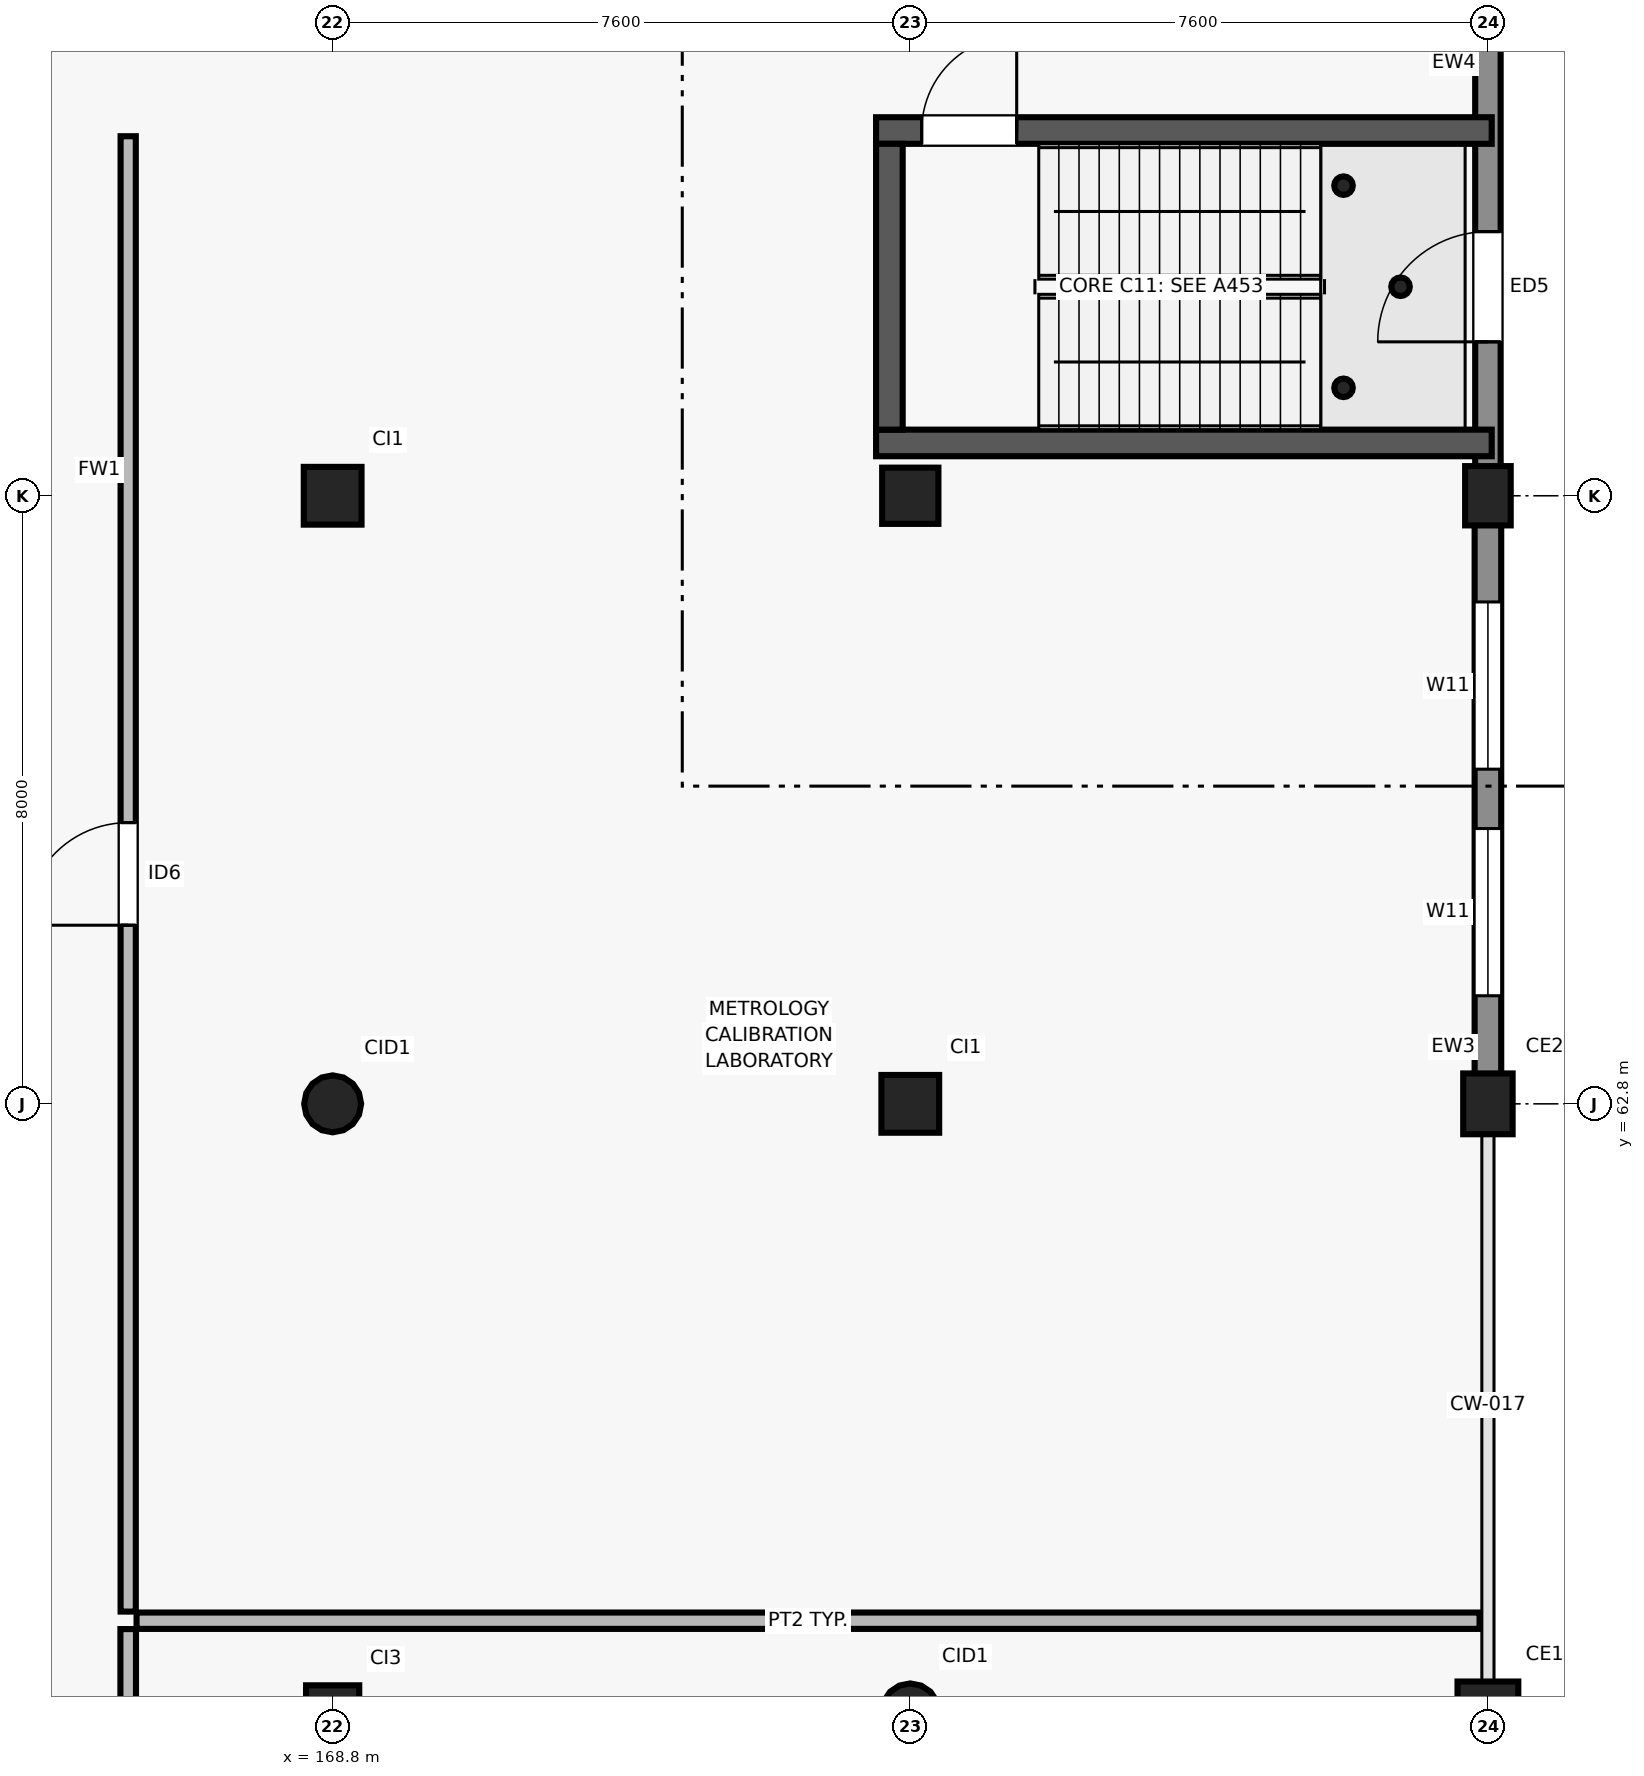
"""IFC4 building model, lengths in metres.
Left out: names, types, materials, properties, quantities, classifications, styles, units other than length and angle.
Written with IfcOpenShell. Run it as: python <this file> out.ifc"""

import sys

from ifc_helpers import new_model, si_unit, direction, frame, frame_2d, origin, origin_2d, place, context, subcontext, project, spatial, rectangle, circle, hollow_circle, extrude, element, fill, save


model = new_model("IFC4")
c1 = context("Model", 3, precision=1e-05, world=origin(), true_north=direction((0.0, 1.0)))
c2 = subcontext(c1, "Body", "Model", "MODEL_VIEW")
j1 = project(units=[si_unit("LENGTHUNIT", "METRE"), si_unit("PLANEANGLEUNIT", "RADIAN")], contexts=[c1])
p1 = place(None, origin())
s1 = spatial("IfcSite", under=j1, at=p1, CompositionType="ELEMENT")
p2 = place(p1, origin())
s2 = spatial("IfcBuilding", under=s1, at=p2, CompositionType="ELEMENT")
p3 = place(p2, origin())
s3 = spatial("IfcBuildingStorey", under=s2, at=p3, CompositionType="ELEMENT", Elevation=0.0)
p4 = place(p3, frame((168.8, 54.8, 0.0), z_axis=(0.0, 0.0, 1.0), x_axis=(1.0, 0.0, 0.0)))
e1 = element("IfcColumn", 1, at=p4, inside=s3, PredefinedType="COLUMN", context=c2, shape_type="SweptSolid", body=[
    extrude(rectangle(XDim=0.7, YDim=0.7, at=origin_2d()), origin(), (0.0, 0.0, 1.0), 4.5),
])
p5 = place(p3, frame((168.8, 62.8, 0.0), z_axis=(0.0, 0.0, 1.0), x_axis=(1.0, 0.0, 0.0)))
e2 = element("IfcColumn", 2, at=p5, inside=s3, PredefinedType="COLUMN", context=c2, shape_type="SweptSolid", body=[
    extrude(circle(Radius=0.375, at=origin_2d()), origin(), (0.0, 0.0, 1.0), 4.5),
])
p6 = place(p3, frame((168.8, 70.8, 0.0), z_axis=(0.0, 0.0, 1.0), x_axis=(1.0, 0.0, 0.0)))
e3 = element("IfcColumn", 3, at=p6, inside=s3, PredefinedType="COLUMN", context=c2, shape_type="SweptSolid", body=[
    extrude(rectangle(XDim=0.76, YDim=0.76, at=origin_2d()), origin(), (0.0, 0.0, 1.0), 4.5),
])
p7 = place(p3, frame((176.4, 54.8, 0.0), z_axis=(0.0, 0.0, 1.0), x_axis=(1.0, 0.0, 0.0)))
e4 = element("IfcColumn", 4, at=p7, inside=s3, PredefinedType="COLUMN", context=c2, shape_type="SweptSolid", body=[
    extrude(circle(Radius=0.375, at=origin_2d()), origin(), (0.0, 0.0, 1.0), 4.5),
])
p8 = place(p3, frame((176.4, 62.8, 0.0), z_axis=(0.0, 0.0, 1.0), x_axis=(1.0, 0.0, 0.0)))
e5 = element("IfcColumn", 5, at=p8, inside=s3, PredefinedType="COLUMN", context=c2, shape_type="SweptSolid", body=[
    extrude(rectangle(XDim=0.76, YDim=0.76, at=origin_2d()), origin(), (0.0, 0.0, 1.0), 4.5),
])
p9 = place(p3, frame((176.4, 70.8, 0.0), z_axis=(0.0, 0.0, 1.0), x_axis=(1.0, 0.0, 0.0)))
e6 = element("IfcColumn", 6, at=p9, inside=s3, PredefinedType="COLUMN", context=c2, shape_type="SweptSolid", body=[
    extrude(rectangle(XDim=0.74, YDim=0.74, at=origin_2d()), origin(), (0.0, 0.0, 1.0), 4.5),
])
p10 = place(p3, frame((184.0, 54.8, 0.0), z_axis=(0.0, 0.0, 1.0), x_axis=(1.0, 0.0, 0.0)))
e7 = element("IfcColumn", 7, at=p10, inside=s3, PredefinedType="COLUMN", context=c2, shape_type="SweptSolid", body=[
    extrude(rectangle(XDim=0.8, YDim=0.8, at=origin_2d()), origin(), (0.0, 0.0, 1.0), 4.5),
])
p11 = place(p3, frame((184.0, 62.8, 0.0), z_axis=(0.0, 0.0, 1.0), x_axis=(1.0, 0.0, 0.0)))
e8 = element("IfcColumn", 8, at=p11, inside=s3, PredefinedType="COLUMN", context=c2, shape_type="SweptSolid", body=[
    extrude(rectangle(XDim=0.8, YDim=0.65, at=origin_2d()), origin(), (0.0, 0.0, 1.0), 4.5),
])
p12 = place(p3, frame((184.0, 70.8, 0.0), z_axis=(0.0, 0.0, 1.0), x_axis=(1.0, 0.0, 0.0)))
e9 = element("IfcColumn", 9, at=p12, inside=s3, PredefinedType="COLUMN", context=c2, shape_type="SweptSolid", body=[
    extrude(rectangle(XDim=0.78, YDim=0.6, at=origin_2d()), origin(), (0.0, 0.0, 1.0), 4.5),
])
p13 = place(p3, frame((184.0, 63.12, 0.0), z_axis=(0.0, 0.0, 1.0), x_axis=(0.0, 1.0, 0.0)))
e10 = element("IfcWall", 10, at=p13, inside=s3, PredefinedType="SOLIDWALL", context=c2, shape_type="SweptSolid", body=[
    extrude(rectangle(XDim=7.385, YDim=0.35, at=frame_2d((3.692, 0.0))), origin(), (0.0, 0.0, 1.0), 3.76),
])
p14 = place(p13, frame((1.102, 0.0, 0.9)))
e11 = element("IfcOpeningElement", 11, at=p14, cuts=e10, PredefinedType="OPENING", context=c2, shape_type="SweptSolid", body=[
    extrude(rectangle(XDim=2.2, YDim=1.5, at=frame_2d((1.1, 0.75))), frame((0.0, 0.185, 0.0), z_axis=(0.0, -1.0, 0.0), x_axis=(1.0, 0.0, 0.0)), (0.0, 0.0, 1.0), 0.37),
])
p15 = place(p13, frame((4.083, 0.0, 0.9)))
e12 = element("IfcOpeningElement", 12, at=p15, cuts=e10, PredefinedType="OPENING", context=c2, shape_type="SweptSolid", body=[
    extrude(rectangle(XDim=2.2, YDim=1.5, at=frame_2d((1.1, 0.75))), frame((0.0, 0.185, 0.0), z_axis=(0.0, -1.0, 0.0), x_axis=(1.0, 0.0, 0.0)), (0.0, 0.0, 1.0), 0.37),
])
p16 = place(p3, frame((184.0, 71.095, 0.0), z_axis=(0.0, 0.0, 1.0), x_axis=(0.0, 1.0, 0.0)))
e13 = element("IfcWall", 13, at=p16, inside=s3, PredefinedType="SOLIDWALL", context=c2, shape_type="SweptSolid", body=[
    extrude(rectangle(XDim=7.369, YDim=0.335, at=frame_2d((3.685, 0.0))), origin(), (0.0, 0.0, 1.0), 4.22),
])
p17 = place(p16, frame((1.73, 0.0, 0.0)))
e14 = element("IfcOpeningElement", 14, at=p17, cuts=e13, PredefinedType="OPENING", context=c2, shape_type="SweptSolid", body=[
    extrude(rectangle(XDim=1.45, YDim=2.2, at=frame_2d((0.725, 1.1))), frame((0.0, 0.177, 0.0), z_axis=(0.0, -1.0, 0.0), x_axis=(1.0, 0.0, 0.0)), (0.0, 0.0, 1.0), 0.355),
])
for number, where, z_axis, x_axis in (
    (15, (182.1, 72.22, -0.405), (0.0, 0.0, 1.0), (1.0, 0.0, 0.0)),
    (16, (182.1, 74.88, -0.405), (0.0, 0.0, 1.0), (1.0, 0.0, 0.0)),
    (17, (182.85, 73.55, -0.405), (0.0, 0.0, 1.0), (1.0, 0.0, 0.0)),
):
    element("IfcColumn", number, at=place(p3, frame(where, z_axis=z_axis, x_axis=x_axis)), inside=s3, PredefinedType="COLUMN", context=c2, shape_type="SweptSolid", body=[
        extrude(hollow_circle(Radius=0.122, WallThickness=0.01, at=origin_2d()), origin(), (0.0, 0.0, 1.0), 4.905),
    ])
p18 = place(p3, frame((175.95, 71.495, 0.0), z_axis=(0.0, 0.0, 1.0), x_axis=(1.0, 0.0, 0.0)))
e18 = element("IfcWall", 18, at=p18, inside=s3, PredefinedType="SHEAR", context=c2, shape_type="SweptSolid", body=[
    extrude(rectangle(XDim=8.1, YDim=0.35, at=frame_2d((4.05, 0.0))), origin(), (0.0, 0.0, 1.0), 4.22),
])
p19 = place(p3, frame((175.95, 75.605, 0.0), z_axis=(0.0, 0.0, 1.0), x_axis=(1.0, 0.0, 0.0)))
e19 = element("IfcWall", 19, at=p19, inside=s3, PredefinedType="SHEAR", context=c2, shape_type="SweptSolid", body=[
    extrude(rectangle(XDim=8.1, YDim=0.35, at=frame_2d((4.05, 0.0))), origin(), (0.0, 0.0, 1.0), 4.22),
])
p20 = place(p19, frame((0.6, 0.0, 0.0)))
e20 = element("IfcOpeningElement", 20, at=p20, cuts=e19, PredefinedType="OPENING", context=c2, shape_type="SweptSolid", body=[
    extrude(rectangle(XDim=1.25, YDim=2.2, at=frame_2d((0.625, 1.1))), frame((0.0, 0.185, 0.0), z_axis=(0.0, -1.0, 0.0), x_axis=(1.0, 0.0, 0.0)), (0.0, 0.0, 1.0), 0.37),
])
p21 = place(p3, frame((176.125, 71.67, 0.0), z_axis=(0.0, 0.0, 1.0), x_axis=(0.0, 1.0, 0.0)))
e21 = element("IfcWall", 21, at=p21, inside=s3, PredefinedType="SHEAR", context=c2, shape_type="SweptSolid", body=[
    extrude(rectangle(XDim=3.76, YDim=0.35, at=frame_2d((1.88, 0.0))), origin(), (0.0, 0.0, 1.0), 4.22),
])
p22 = place(p3, frame((166.22, 56.0, 0.0), z_axis=(0.0, 0.0, 1.0), x_axis=(1.0, 0.0, 0.0)))
e22 = element("IfcWall", 22, at=p22, inside=s3, PredefinedType="PARTITIONING", context=c2, shape_type="SweptSolid", body=[
    extrude(rectangle(XDim=17.67, YDim=0.215, at=frame_2d((8.835, 0.0))), origin(), (0.0, 0.0, 1.0), 4.2),
])
p23 = place(p3, frame((166.11, 38.91, 0.0), z_axis=(0.0, 0.0, 1.0), x_axis=(0.0, 1.0, 0.0)))
e23 = element("IfcWall", 23, at=p23, inside=s3, PredefinedType="PARTITIONING", context=c2, shape_type="SweptSolid", body=[
    extrude(rectangle(XDim=16.98, YDim=0.205, at=frame_2d((8.49, 0.0))), origin(), (0.0, 0.0, 1.0), 4.2),
])
p24 = place(p23, frame((8.03, 0.0, 0.0)))
e24 = element("IfcOpeningElement", 24, at=p24, cuts=e23, PredefinedType="OPENING", context=c2, shape_type="SweptSolid", body=[
    extrude(rectangle(XDim=0.92, YDim=2.1, at=frame_2d((0.46, 1.05))), frame((0.0, 0.113, 0.0), z_axis=(0.0, -1.0, 0.0), x_axis=(1.0, 0.0, 0.0)), (0.0, 0.0, 1.0), 0.225),
])
p25 = place(p3, frame((166.11, 56.12, 0.0), z_axis=(0.0, 0.0, 1.0), x_axis=(0.0, 1.0, 0.0)))
e25 = element("IfcWall", 25, at=p25, inside=s3, PredefinedType="SOLIDWALL", context=c2, shape_type="SweptSolid", body=[
    extrude(rectangle(XDim=19.41, YDim=0.2, at=frame_2d((9.705, 0.0))), origin(), (0.0, 0.0, 1.0), 4.2),
])
p26 = place(p25, frame((9.03, 0.0, 0.0)))
e26 = element("IfcOpeningElement", 26, at=p26, cuts=e25, PredefinedType="OPENING", context=c2, shape_type="SweptSolid", body=[
    extrude(rectangle(XDim=1.35, YDim=2.2, at=frame_2d((0.675, 1.1))), frame((0.0, 0.11, 0.0), z_axis=(0.0, -1.0, 0.0), x_axis=(1.0, 0.0, 0.0)), (0.0, 0.0, 1.0), 0.22),
])
p27 = place(p14, origin())
e27 = element("IfcWindow", 27, at=p27, inside=s3, PartitioningType="SINGLE_PANEL", PredefinedType="WINDOW", context=c2, shape_type="SweptSolid", body=[
    extrude(rectangle(XDim=2.2, YDim=1.5, at=frame_2d((1.1, 0.75))), frame((0.0, 0.03, 0.0), z_axis=(0.0, -1.0, 0.0), x_axis=(1.0, 0.0, 0.0)), (0.0, 0.0, 1.0), 0.06),
])
fill(e11, e27)
p28 = place(p15, origin())
e28 = element("IfcWindow", 28, at=p28, inside=s3, PartitioningType="SINGLE_PANEL", PredefinedType="WINDOW", context=c2, shape_type="SweptSolid", body=[
    extrude(rectangle(XDim=2.2, YDim=1.5, at=frame_2d((1.1, 0.75))), frame((0.0, 0.03, 0.0), z_axis=(0.0, -1.0, 0.0), x_axis=(1.0, 0.0, 0.0)), (0.0, 0.0, 1.0), 0.06),
])
fill(e12, e28)
p29 = place(p17, frame((1.45, 0.0, 0.0), z_axis=(0.0, 0.0, 1.0), x_axis=(-1.0, 0.0, 0.0)))
e29 = element("IfcDoor", 29, at=p29, inside=s3, OperationType="SINGLE_SWING_LEFT", PredefinedType="DOOR", context=c2, shape_type="SweptSolid", body=[
    extrude(rectangle(XDim=1.45, YDim=2.2, at=frame_2d((0.725, 1.1))), frame((0.0, 0.025, 0.0), z_axis=(0.0, -1.0, 0.0), x_axis=(1.0, 0.0, 0.0)), (0.0, 0.0, 1.0), 0.05),
])
fill(e14, e29)
p30 = place(p20, origin())
e30 = element("IfcDoor", 30, at=p30, inside=s3, OperationType="SINGLE_SWING_RIGHT", PredefinedType="DOOR", context=c2, shape_type="SweptSolid", body=[
    extrude(rectangle(XDim=1.25, YDim=2.2, at=frame_2d((0.625, 1.1))), frame((0.0, 0.025, 0.0), z_axis=(0.0, -1.0, 0.0), x_axis=(1.0, 0.0, 0.0)), (0.0, 0.0, 1.0), 0.05),
])
fill(e20, e30)
p31 = place(p26, origin())
e31 = element("IfcDoor", 31, at=p31, inside=s3, OperationType="SINGLE_SWING_LEFT", PredefinedType="DOOR", context=c2, shape_type="SweptSolid", body=[
    extrude(rectangle(XDim=1.35, YDim=2.2, at=frame_2d((0.675, 1.1))), frame((0.0, 0.025, 0.0), z_axis=(0.0, -1.0, 0.0), x_axis=(1.0, 0.0, 0.0)), (0.0, 0.0, 1.0), 0.05),
])
fill(e26, e31)
save(model, sys.argv[1])
